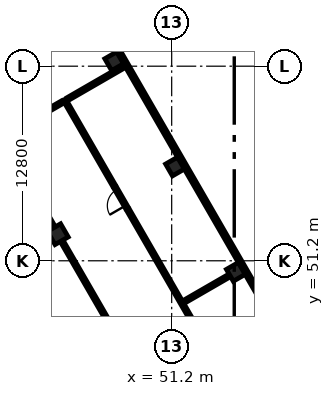
"""IFC4 building model, lengths in metres.
Left out: names, types, materials, properties, quantities, classifications, styles, units other than length and angle.
Written with IfcOpenShell. Run it as: python <this file> out.ifc"""

import sys

from ifc_helpers import new_model, si_unit, direction, frame, frame_2d, origin, origin_2d, place, context, subcontext, project, spatial, rectangle, extrude, element, fill, save


model = new_model("IFC4")
c1 = context("Model", 3, precision=1e-05, world=origin(), true_north=direction((0.0, 1.0)))
c2 = subcontext(c1, "Body", "Model", "MODEL_VIEW")
j1 = project(units=[si_unit("LENGTHUNIT", "METRE"), si_unit("PLANEANGLEUNIT", "RADIAN")], contexts=[c1])
p1 = place(None, origin())
s1 = spatial("IfcSite", under=j1, at=p1, CompositionType="ELEMENT")
p2 = place(p1, origin())
s2 = spatial("IfcBuilding", under=s1, at=p2, CompositionType="ELEMENT")
p3 = place(p2, origin())
s3 = spatial("IfcBuildingStorey", under=s2, at=p3, CompositionType="ELEMENT", Elevation=0.0)
p4 = place(p3, frame((55.417, 50.47, -0.3), z_axis=(0.0, 0.0, 1.0), x_axis=(-0.5, 0.866025403784, 0.0)))
e1 = element("IfcColumn", 1, at=p4, inside=s3, PredefinedType="COLUMN", context=c2, shape_type="SweptSolid", body=[
    extrude(rectangle(XDim=0.9, YDim=0.9, at=origin_2d()), origin(), (0.0, 0.0, 1.0), 6.3),
])
p5 = place(p3, frame((43.71, 52.948, -0.3), z_axis=(0.0, 0.0, 1.0), x_axis=(-0.5, 0.866025403784, 0.0)))
e2 = element("IfcColumn", 2, at=p5, inside=s3, PredefinedType="COLUMN", context=c2, shape_type="SweptSolid", body=[
    extrude(rectangle(XDim=1.0, YDim=1.0, at=origin_2d()), origin(), (0.0, 0.0, 1.0), 6.3),
])
for number, where, z_axis, x_axis in (
    (3, (51.417, 57.399, -0.3), (0.0, 0.0, 1.0), (-0.5, 0.866, 0.0)),
    (4, (47.417, 64.327, -0.3), (0.0, 0.0, 1.0), (-0.5, 0.866, 0.0)),
):
    element("IfcColumn", number, at=place(p3, frame(where, z_axis=z_axis, x_axis=x_axis)), inside=s3, PredefinedType="COLUMN", context=c2, shape_type="SweptSolid", body=[
        extrude(rectangle(XDim=0.9, YDim=0.9, at=origin_2d()), origin(), (0.0, 0.0, 1.0), 6.3),
    ])
p6 = place(p3, frame((47.49, 65.351, 0.0), z_axis=(0.0, 0.0, 1.0), x_axis=(0.499999548647, -0.866025664373, 0.0)))
e5 = element("IfcWall", 5, at=p6, inside=s3, PredefinedType="SOLIDWALL", context=c2, shape_type="SweptSolid", body=[
    extrude(rectangle(XDim=34.6, YDim=0.25, at=frame_2d((17.3, 0.0))), origin(), (0.0, 0.0, 1.0), 5.7),
])
p7 = place(p3, frame((47.46, 46.453, 0.0), z_axis=(0.0, 0.0, 1.0), x_axis=(-0.499995173006, 0.866028190633, 0.0)))
e6 = element("IfcWall", 6, at=p7, inside=s3, PredefinedType="PARTITIONING", context=c2, shape_type="SweptSolid", body=[
    extrude(rectangle(XDim=7.0, YDim=0.2, at=frame_2d((3.5, 0.0))), origin(), (0.0, 0.0, 1.0), 5.1),
])
p8 = place(p3, frame((43.46, 53.382, 0.0), z_axis=(0.0, 0.0, 1.0), x_axis=(-0.499988857673, 0.866031836714, 0.0)))
e7 = element("IfcWall", 7, at=p8, inside=s3, PredefinedType="PARTITIONING", context=c2, shape_type="SweptSolid", body=[
    extrude(rectangle(XDim=6.875, YDim=0.2, at=frame_2d((3.438, 0.0))), origin(), (0.0, 0.0, 1.0), 5.1),
])
p9 = place(p3, frame((55.442, 42.228, 0.0), z_axis=(0.0, 0.0, 1.0), x_axis=(-0.500004228592, 0.866022962392, 0.0)))
e8 = element("IfcWall", 8, at=p9, inside=s3, PredefinedType="PARTITIONING", context=c2, shape_type="SweptSolid", body=[
    extrude(rectangle(XDim=14.3, YDim=0.2, at=frame_2d((7.15, 0.0))), origin(), (0.0, 0.0, 1.0), 5.1),
])
p10 = place(p3, frame((48.292, 54.613, 0.0), z_axis=(0.0, 0.0, 1.0), x_axis=(-0.499954529098, 0.86605165483, 0.0)))
e9 = element("IfcWall", 9, at=p10, inside=s3, PredefinedType="PARTITIONING", context=c2, shape_type="SweptSolid", body=[
    extrude(rectangle(XDim=1.7, YDim=0.2, at=frame_2d((0.85, 0.0))), origin(), (0.0, 0.0, 1.0), 5.1),
])
p11 = place(p10, frame((0.25, 0.0, 0.0)))
e10 = element("IfcOpeningElement", 10, at=p11, cuts=e9, PredefinedType="OPENING", context=c2, shape_type="SweptSolid", body=[
    extrude(rectangle(XDim=1.2, YDim=2.1, at=frame_2d((0.6, 1.05))), frame((0.0, 0.11, 0.0), z_axis=(0.0, -1.0, 0.0), x_axis=(1.0, 0.0, 0.0)), (0.0, 0.0, 1.0), 0.22),
])
p12 = place(p3, frame((47.442, 56.085, 0.0), z_axis=(0.0, 0.0, 1.0), x_axis=(-0.499990197047, 0.866031063448, 0.0)))
e11 = element("IfcWall", 11, at=p12, inside=s3, PredefinedType="PARTITIONING", context=c2, shape_type="SweptSolid", body=[
    extrude(rectangle(XDim=6.525, YDim=0.2, at=frame_2d((3.263, 0.0))), origin(), (0.0, 0.0, 1.0), 5.1),
])
p13 = place(p3, frame((51.953, 48.47, 0.0), z_axis=(0.0, 0.0, 1.0), x_axis=(0.8660424351, 0.499970499736, 0.0)))
e12 = element("IfcWall", 12, at=p13, inside=s3, PredefinedType="PARTITIONING", context=c2, shape_type="SweptSolid", body=[
    extrude(rectangle(XDim=3.55, YDim=0.2, at=frame_2d((1.775, 0.0))), origin(), (0.0, 0.0, 1.0), 5.1),
])
p14 = place(p3, frame((35.829, 48.399, 0.0), z_axis=(0.0, 0.0, 1.0), x_axis=(0.866033360935, 0.499986217557, 0.0)))
e13 = element("IfcWall", 13, at=p14, inside=s3, PredefinedType="PARTITIONING", context=c2, shape_type="SweptSolid", body=[
    extrude(rectangle(XDim=8.6, YDim=0.2, at=frame_2d((4.3, 0.0))), origin(), (0.0, 0.0, 1.0), 5.1),
])
p15 = place(p3, frame((44.266, 61.786, 0.0), z_axis=(0.0, 0.0, 1.0), x_axis=(0.866036664382, 0.499980495566, 0.0)))
e14 = element("IfcWall", 14, at=p15, inside=s3, PredefinedType="PARTITIONING", context=c2, shape_type="SweptSolid", body=[
    extrude(rectangle(XDim=4.45, YDim=0.2, at=frame_2d((2.225, 0.0))), origin(), (0.0, 0.0, 1.0), 5.1),
])
p16 = place(p3, frame((40.109, 59.385, 0.0), z_axis=(0.0, 0.0, 1.0), x_axis=(0.866016770315, 0.500014953309, 0.0)))
e15 = element("IfcWall", 15, at=p16, inside=s3, PredefinedType="PARTITIONING", context=c2, shape_type="SweptSolid", body=[
    extrude(rectangle(XDim=4.6, YDim=0.2, at=frame_2d((2.3, 0.0))), origin(), (0.0, 0.0, 1.0), 5.1),
])
p17 = place(p16, frame((1.4, 0.0, 0.0)))
e16 = element("IfcOpeningElement", 16, at=p17, cuts=e15, PredefinedType="OPENING", context=c2, shape_type="SweptSolid", body=[
    extrude(rectangle(XDim=1.8, YDim=2.1, at=frame_2d((0.9, 1.05))), frame((0.0, 0.11, 0.0), z_axis=(0.0, -1.0, 0.0), x_axis=(1.0, 0.0, 0.0)), (0.0, 0.0, 1.0), 0.22),
])
p18 = place(p11, origin())
e17 = element("IfcDoor", 17, at=p18, inside=s3, OperationType="SINGLE_SWING_LEFT", PredefinedType="DOOR", context=c2, shape_type="SweptSolid", body=[
    extrude(rectangle(XDim=1.2, YDim=2.1, at=frame_2d((0.6, 1.05))), frame((0.0, 0.025, 0.0), z_axis=(0.0, -1.0, 0.0), x_axis=(1.0, 0.0, 0.0)), (0.0, 0.0, 1.0), 0.05),
])
fill(e10, e17)
save(model, sys.argv[1])
